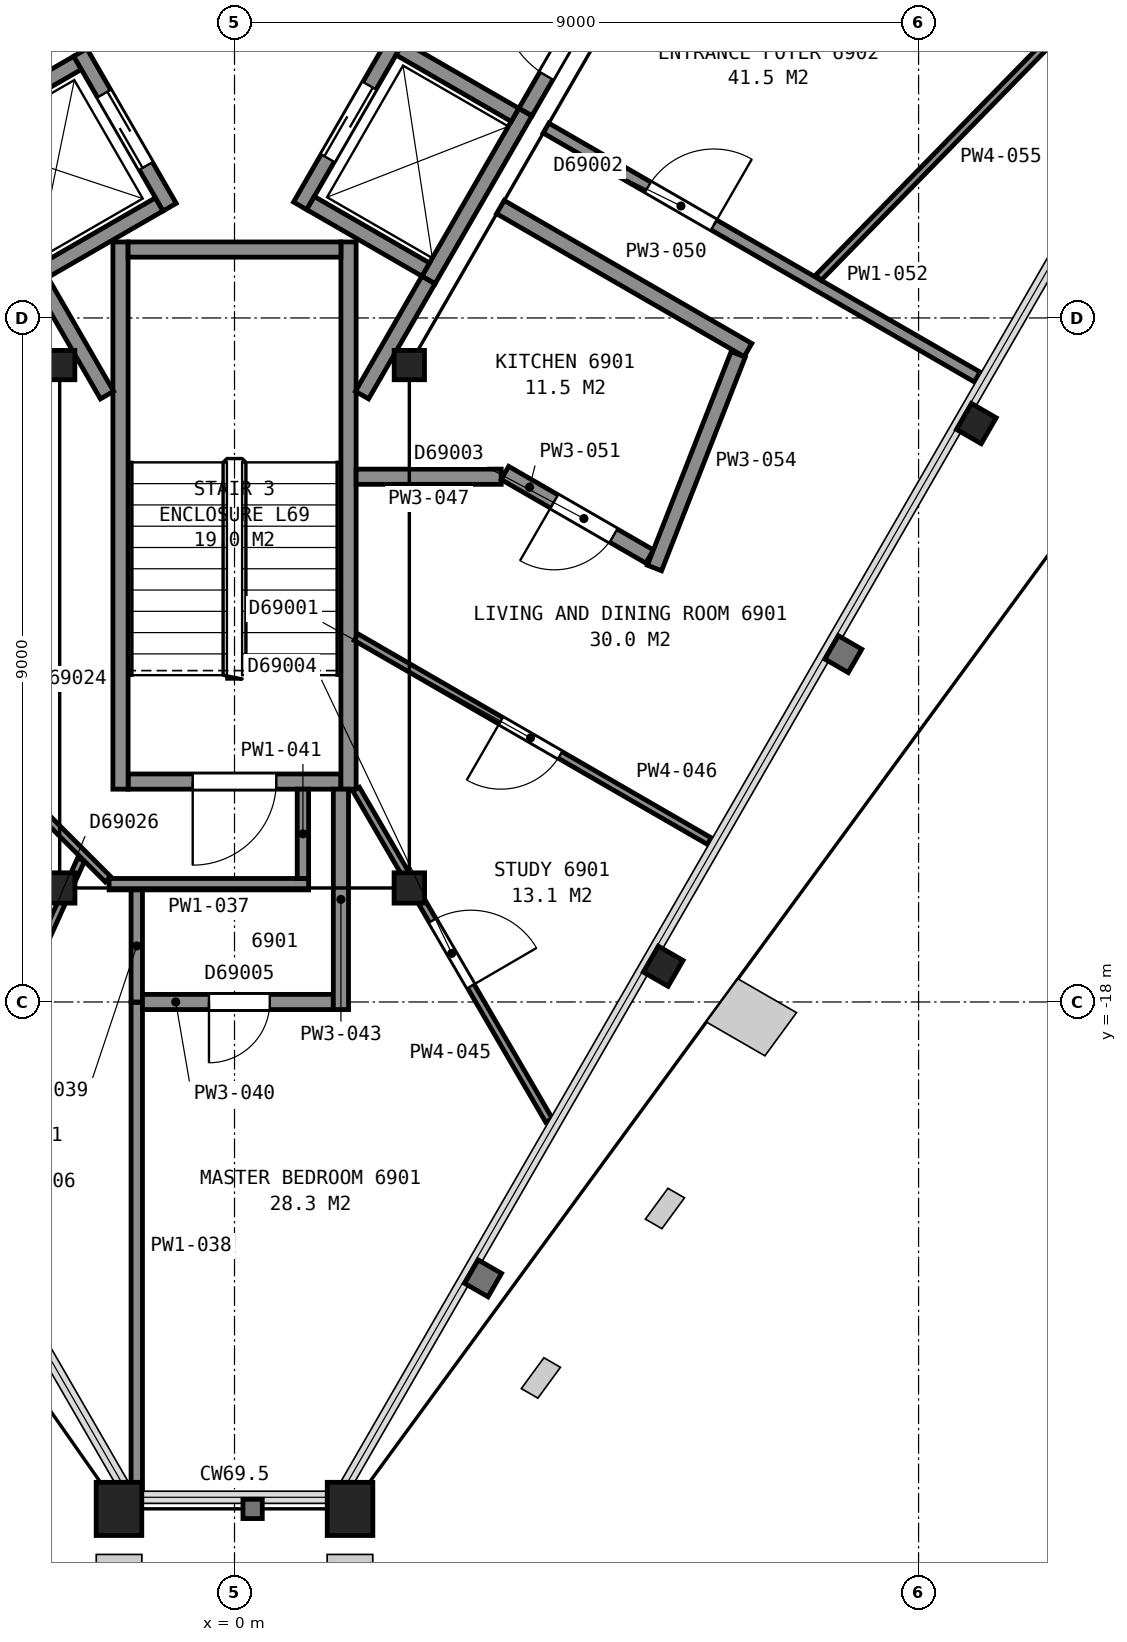
"""IFC4 building model, lengths in metres.
Left out: names, types, materials, properties, quantities, classifications, styles, units other than length and angle.
Written with IfcOpenShell. Run it as: python <this file> out.ifc"""

import sys

from ifc_helpers import new_model, si_unit, direction, frame, frame_2d, origin, origin_2d, place, context, subcontext, project, spatial, rectangle, hollow_rectangle, i_section, extrude, element, fill, save


model = new_model("IFC4")
c1 = context("Model", 3, precision=1e-05, world=origin(), true_north=direction((0.0, 1.0)))
c2 = subcontext(c1, "Body", "Model", "MODEL_VIEW")
j1 = project(units=[si_unit("LENGTHUNIT", "METRE"), si_unit("PLANEANGLEUNIT", "RADIAN")], contexts=[c1])
p1 = place(None, origin())
s1 = spatial("IfcSite", under=j1, at=p1, CompositionType="ELEMENT")
p2 = place(p1, origin())
s2 = spatial("IfcBuilding", under=s1, at=p2, CompositionType="ELEMENT")
p3 = place(p2, frame((0.0, 0.0, 275.1)))
s3 = spatial("IfcBuildingStorey", under=s2, at=p3, CompositionType="ELEMENT", Elevation=275.1)
for number, where, z_axis, x_axis in (
    (1, (-1.52, -24.67, 0.0), (0.0, 0.0, 1.0), (-1.0, 0.0, 0.0)),
    (2, (1.52, -24.67, 0.0), (0.0, 0.0, 1.0), (-1.0, 0.0, 0.0)),
):
    element("IfcColumn", number, at=place(p3, frame(where, z_axis=z_axis, x_axis=x_axis)), inside=s3, PredefinedType="COLUMN", context=c2, shape_type="SweptSolid", body=[
        extrude(hollow_rectangle(XDim=0.6, YDim=0.7, WallThickness=0.04, at=origin_2d()), origin(), (0.0, 0.0, 1.0), 3.7),
    ])
for number, where, z_axis, x_axis in (
    (3, (5.64, -17.53, 0.0), (0.0, 0.0, 1.0), (-0.5, -0.866, 0.0)),
    (4, (9.76, -10.39, 0.0), (0.0, 0.0, 1.0), (-0.5, -0.866, 0.0)),
):
    element("IfcColumn", number, at=place(p3, frame(where, z_axis=z_axis, x_axis=x_axis)), inside=s3, PredefinedType="COLUMN", context=c2, shape_type="SweptSolid", body=[
        extrude(i_section(OverallWidth=0.394, OverallDepth=0.376, WebThickness=0.017, FlangeThickness=0.028, FilletRadius=0.015, at=origin_2d()), origin(), (0.0, 0.0, 1.0), 3.7),
    ])
p4 = place(p3, frame((-2.3, -9.62, 0.0), z_axis=(0.0, 0.0, 1.0), x_axis=(1.0, 0.0, 0.0)))
e5 = element("IfcColumn", 5, at=p4, inside=s3, PredefinedType="COLUMN", context=c2, shape_type="SweptSolid", body=[
    extrude(i_section(OverallWidth=0.399, OverallDepth=0.386, WebThickness=0.021, FlangeThickness=0.033, FilletRadius=0.015, at=origin_2d()), origin(), (0.0, 0.0, 1.0), 3.7),
])
for number, where, z_axis, x_axis in (
    (6, (-2.3, -16.5, 0.0), (0.0, 0.0, 1.0), (-1.0, 0.0, 0.0)),
    (7, (2.3, -16.5, 0.0), (0.0, 0.0, 1.0), (-1.0, 0.0, 0.0)),
):
    element("IfcColumn", number, at=place(p3, frame(where, z_axis=z_axis, x_axis=x_axis)), inside=s3, PredefinedType="COLUMN", context=c2, shape_type="SweptSolid", body=[
        extrude(i_section(OverallWidth=0.401, OverallDepth=0.399, WebThickness=0.025, FlangeThickness=0.04, FilletRadius=0.015, at=origin_2d()), origin(), (0.0, 0.0, 1.0), 3.7),
    ])
p5 = place(p3, frame((2.3, -9.62, 0.0), z_axis=(0.0, 0.0, 1.0), x_axis=(1.0, 0.0, 0.0)))
e8 = element("IfcColumn", 8, at=p5, inside=s3, PredefinedType="COLUMN", context=c2, shape_type="SweptSolid", body=[
    extrude(i_section(OverallWidth=0.399, OverallDepth=0.386, WebThickness=0.021, FlangeThickness=0.033, FilletRadius=0.015, at=origin_2d()), origin(), (0.0, 0.0, 1.0), 3.7),
])
p6 = place(p3, frame((-1.4, -15.1, 0.0), z_axis=(0.0, 0.0, 1.0), x_axis=(1.0, 0.0, 0.0)))
e9 = element("IfcWall", 9, at=p6, inside=s3, PredefinedType="PARTITIONING", context=c2, shape_type="SweptSolid", body=[
    extrude(rectangle(XDim=2.8, YDim=0.2, at=frame_2d((1.4, 0.0))), origin(), (0.0, 0.0, 1.0), 3.45),
])
p7 = place(p6, frame((0.85, 0.0, 0.0)))
e10 = element("IfcOpeningElement", 10, at=p7, cuts=e9, PredefinedType="OPENING", context=c2, shape_type="SweptSolid", body=[
    extrude(rectangle(XDim=1.1, YDim=2.1, at=frame_2d((0.55, 1.05))), frame((0.0, 0.11, 0.0), z_axis=(0.0, -1.0, 0.0), x_axis=(1.0, 0.0, 0.0)), (0.0, 0.0, 1.0), 0.22),
])
for number, where, z_axis, x_axis in (
    (11, (1.5, -8.0, 0.0), (0.0, 0.0, 1.0), (0.0, -1.0, 0.0)),
    (12, (-1.5, -8.0, 0.0), (0.0, 0.0, 1.0), (0.0, -1.0, 0.0)),
):
    element("IfcWall", number, at=place(p3, frame(where, z_axis=z_axis, x_axis=x_axis)), inside=s3, PredefinedType="PARTITIONING", context=c2, shape_type="SweptSolid", body=[
        extrude(rectangle(XDim=7.2, YDim=0.2, at=frame_2d((3.6, 0.0))), origin(), (0.0, 0.0, 1.0), 3.45),
    ])
p8 = place(p3, frame((-1.4, -8.1, 0.0), z_axis=(0.0, 0.0, 1.0), x_axis=(1.0, 0.0, 0.0)))
e13 = element("IfcWall", 13, at=p8, inside=s3, PredefinedType="PARTITIONING", context=c2, shape_type="SweptSolid", body=[
    extrude(rectangle(XDim=2.8, YDim=0.2, at=frame_2d((1.4, 0.0))), origin(), (0.0, 0.0, 1.0), 3.45),
])
for number, where, z_axis, x_axis in (
    (14, (-2.505, -8.38, 0.0), (0.0, 0.0, 1.0), (0.866, 0.5, 0.0)),
    (15, (-3.58, -6.519, 0.0), (0.0, 0.0, 1.0), (0.866, 0.5, 0.0)),
):
    element("IfcWall", number, at=place(p3, frame(where, z_axis=z_axis, x_axis=x_axis)), inside=s3, PredefinedType="PARTITIONING", context=c2, shape_type="SweptSolid", body=[
        extrude(rectangle(XDim=1.75, YDim=0.2, at=frame_2d((0.875, 0.0))), origin(), (0.0, 0.0, 1.0), 3.7),
    ])
p9 = place(p3, frame((2.552, -8.5, 0.0), z_axis=(0.0, 0.0, 1.0), x_axis=(0.499990435942, 0.866030925526, 0.0)))
e16 = element("IfcWall", 16, at=p9, inside=s3, PredefinedType="PARTITIONING", context=c2, shape_type="SweptSolid", body=[
    extrude(rectangle(XDim=2.55, YDim=0.2, at=frame_2d((1.275, 0.0))), origin(), (0.0, 0.0, 1.0), 3.7),
])
p10 = place(p3, frame((0.863, -7.525, 0.0), z_axis=(0.0, 0.0, 1.0), x_axis=(0.499990435942, 0.866030925526, 0.0)))
e17 = element("IfcWall", 17, at=p10, inside=s3, PredefinedType="PARTITIONING", context=c2, shape_type="SweptSolid", body=[
    extrude(rectangle(XDim=2.55, YDim=0.2, at=frame_2d((1.275, 0.0))), origin(), (0.0, 0.0, 1.0), 3.7),
])
p11 = place(p10, frame((0.725, 0.0, 0.0)))
e18 = element("IfcOpeningElement", 18, at=p11, cuts=e17, PredefinedType="OPENING", context=c2, shape_type="SweptSolid", body=[
    extrude(rectangle(XDim=1.1, YDim=2.1, at=frame_2d((0.55, 1.05))), frame((0.0, 0.11, 0.0), z_axis=(0.0, -1.0, 0.0), x_axis=(1.0, 0.0, 0.0)), (0.0, 0.0, 1.0), 0.22),
])
p12 = place(p3, frame((-0.853, -7.542, 0.0), z_axis=(0.0, 0.0, 1.0), x_axis=(-0.500016218704, 0.866016039709, 0.0)))
e19 = element("IfcWall", 19, at=p12, inside=s3, PredefinedType="PARTITIONING", context=c2, shape_type="SweptSolid", body=[
    extrude(rectangle(XDim=2.35, YDim=0.2, at=frame_2d((1.175, 0.0))), origin(), (0.0, 0.0, 1.0), 3.7),
])
p13 = place(p12, frame((0.625, 0.0, 0.0)))
e20 = element("IfcOpeningElement", 20, at=p13, cuts=e19, PredefinedType="OPENING", context=c2, shape_type="SweptSolid", body=[
    extrude(rectangle(XDim=1.1, YDim=2.1, at=frame_2d((0.55, 1.05))), frame((0.0, 0.11, 0.0), z_axis=(0.0, -1.0, 0.0), x_axis=(1.0, 0.0, 0.0)), (0.0, 0.0, 1.0), 0.22),
])
for number, where, z_axis, x_axis in (
    (21, (3.69, -6.328, 0.0), (0.0, 0.0, 1.0), (-0.866, 0.5, 0.0)),
    (22, (2.515, -8.363, 0.0), (0.0, 0.0, 1.0), (-0.866, 0.5, 0.0)),
):
    element("IfcWall", number, at=place(p3, frame(where, z_axis=z_axis, x_axis=x_axis)), inside=s3, PredefinedType="PARTITIONING", context=c2, shape_type="SweptSolid", body=[
        extrude(rectangle(XDim=1.75, YDim=0.2, at=frame_2d((0.875, 0.0))), origin(), (0.0, 0.0, 1.0), 3.7),
    ])
p14 = place(p3, frame((-2.541, -8.519, 0.0), z_axis=(0.0, 0.0, 1.0), x_axis=(0.500016142392, -0.86601608377, 0.0)))
e23 = element("IfcWall", 23, at=p14, inside=s3, PredefinedType="PARTITIONING", context=c2, shape_type="SweptSolid", body=[
    extrude(rectangle(XDim=1.727, YDim=0.2, at=frame_2d((0.864, 0.0))), origin(), (0.0, 0.0, 1.0), 3.45),
])
p15 = place(p3, frame((1.677, -10.015, 0.0), z_axis=(0.0, 0.0, 1.0), x_axis=(0.49983532306, 0.866120459187, 0.0)))
e24 = element("IfcWall", 24, at=p15, inside=s3, PredefinedType="PARTITIONING", context=c2, shape_type="SweptSolid", body=[
    extrude(rectangle(XDim=1.748, YDim=0.2, at=frame_2d((0.874, 0.0))), origin(), (0.0, 0.0, 1.0), 3.45),
])
p16 = place(p3, frame((3.828, -6.29, 0.0), z_axis=(0.0, 0.0, 1.0), x_axis=(0.499979739078, 0.866037101117, 0.0)))
e25 = element("IfcWall", 25, at=p16, inside=s3, PredefinedType="PARTITIONING", context=c2, shape_type="SweptSolid", body=[
    extrude(rectangle(XDim=11.363, YDim=0.2, at=frame_2d((5.681, 0.0))), origin(), (0.0, 0.0, 1.0), 3.45),
])
p17 = place(p16, frame((0.55, 0.0, 0.0)))
e26 = element("IfcOpeningElement", 26, at=p17, cuts=e25, PredefinedType="OPENING", context=c2, shape_type="SweptSolid", body=[
    extrude(rectangle(XDim=1.2, YDim=2.1, at=frame_2d((0.6, 1.05))), frame((0.0, 0.11, 0.0), z_axis=(0.0, -1.0, 0.0), x_axis=(1.0, 0.0, 0.0)), (0.0, 0.0, 1.0), 0.22),
])
p18 = place(p3, frame((-2.019, -16.127, 0.0), z_axis=(0.0, 0.0, 1.0), x_axis=(-0.411876718461, -0.911239578151, 0.0)))
e27 = element("IfcWall", 27, at=p18, inside=s3, PredefinedType="PARTITIONING", context=c2, shape_type="SweptSolid", body=[
    extrude(rectangle(XDim=4.376, YDim=0.1, at=frame_2d((2.188, 0.0))), origin(), (0.0, 0.0, 1.0), 2.723),
])
p19 = place(p18, frame((1.591, 0.0, 0.0)))
e28 = element("IfcOpeningElement", 28, at=p19, cuts=e27, PredefinedType="OPENING", context=c2, shape_type="SweptSolid", body=[
    extrude(rectangle(XDim=1.0, YDim=2.1, at=frame_2d((0.5, 1.05))), frame((0.0, 0.06, 0.0), z_axis=(0.0, -1.0, 0.0), x_axis=(1.0, 0.0, 0.0)), (0.0, 0.0, 1.0), 0.12),
])
p20 = place(p3, frame((-2.801, -15.25, 0.0), z_axis=(0.0, 0.0, 1.0), x_axis=(0.707106781187, -0.707106781187, 0.0)))
e29 = element("IfcWall", 29, at=p20, inside=s3, PredefinedType="PARTITIONING", context=c2, shape_type="SweptSolid", body=[
    extrude(rectangle(XDim=1.608, YDim=0.1, at=frame_2d((0.804, 0.0))), origin(), (0.0, 0.0, 1.0), 2.723),
])
p21 = place(p3, frame((-1.65, -16.45, 0.0), z_axis=(0.0, 0.0, 1.0), x_axis=(1.0, 0.0, 0.0)))
e30 = element("IfcWall", 30, at=p21, inside=s3, PredefinedType="PARTITIONING", context=c2, shape_type="SweptSolid", body=[
    extrude(rectangle(XDim=2.625, YDim=0.15, at=frame_2d((1.312, 0.0))), origin(), (0.0, 0.0, 1.0), 2.723),
])
p22 = place(p3, frame((-1.286, -24.421, 0.0), z_axis=(0.0, 0.0, 1.0), x_axis=(0.0, 1.0, 0.0)))
e31 = element("IfcWall", 31, at=p22, inside=s3, PredefinedType="PARTITIONING", context=c2, shape_type="SweptSolid", body=[
    extrude(rectangle(XDim=6.416, YDim=0.15, at=frame_2d((3.208, 0.0))), origin(), (0.0, 0.0, 1.0), 2.723),
])
p23 = place(p3, frame((-1.286, -18.0, 0.0), z_axis=(0.0, 0.0, 1.0), x_axis=(0.0, 1.0, 0.0)))
e32 = element("IfcWall", 32, at=p23, inside=s3, PredefinedType="PARTITIONING", context=c2, shape_type="SweptSolid", body=[
    extrude(rectangle(XDim=1.475, YDim=0.15, at=frame_2d((0.738, 0.0))), origin(), (0.0, 0.0, 1.0), 2.723),
])
p24 = place(p3, frame((-1.211, -18.0, 0.0), z_axis=(0.0, 0.0, 1.0), x_axis=(1.0, 0.0, 0.0)))
e33 = element("IfcWall", 33, at=p24, inside=s3, PredefinedType="PARTITIONING", context=c2, shape_type="SweptSolid", body=[
    extrude(rectangle(XDim=2.511, YDim=0.2, at=frame_2d((1.255, 0.0))), origin(), (0.0, 0.0, 1.0), 2.723),
])
p25 = place(p24, frame((0.875, 0.0, 0.0)))
e34 = element("IfcOpeningElement", 34, at=p25, cuts=e33, PredefinedType="OPENING", context=c2, shape_type="SweptSolid", body=[
    extrude(rectangle(XDim=0.8, YDim=2.1, at=frame_2d((0.4, 1.05))), frame((0.0, 0.11, 0.0), z_axis=(0.0, -1.0, 0.0), x_axis=(1.0, 0.0, 0.0)), (0.0, 0.0, 1.0), 0.22),
])
p26 = place(p3, frame((0.9, -16.375, 0.0), z_axis=(0.0, 0.0, 1.0), x_axis=(0.0, 1.0, 0.0)))
e35 = element("IfcWall", 35, at=p26, inside=s3, PredefinedType="PARTITIONING", context=c2, shape_type="SweptSolid", body=[
    extrude(rectangle(XDim=1.175, YDim=0.15, at=frame_2d((0.587, 0.0))), origin(), (0.0, 0.0, 1.0), 2.723),
])
p27 = place(p3, frame((1.4, -18.1, 0.0), z_axis=(0.0, 0.0, 1.0), x_axis=(0.0, 1.0, 0.0)))
e36 = element("IfcWall", 36, at=p27, inside=s3, PredefinedType="PARTITIONING", context=c2, shape_type="SweptSolid", body=[
    extrude(rectangle(XDim=2.9, YDim=0.2, at=frame_2d((1.45, 0.0))), origin(), (0.0, 0.0, 1.0), 2.723),
])
p28 = place(p3, frame((4.137, -19.557, 0.0), z_axis=(0.0, 0.0, 1.0), x_axis=(-0.503229634544, 0.864152726615, 0.0)))
e37 = element("IfcWall", 37, at=p28, inside=s3, PredefinedType="PARTITIONING", context=c2, shape_type="SweptSolid", body=[
    extrude(rectangle(XDim=5.042, YDim=0.1, at=frame_2d((2.521, 0.0))), origin(), (0.0, 0.0, 1.0), 2.723),
])
p29 = place(p28, frame((2.042, 0.0, 0.0)))
e38 = element("IfcOpeningElement", 38, at=p29, cuts=e37, PredefinedType="OPENING", context=c2, shape_type="SweptSolid", body=[
    extrude(rectangle(XDim=1.0, YDim=2.1, at=frame_2d((0.5, 1.05))), frame((0.0, 0.06, 0.0), z_axis=(0.0, -1.0, 0.0), x_axis=(1.0, 0.0, 0.0)), (0.0, 0.0, 1.0), 0.12),
])
p30 = place(p3, frame((6.247, -15.883, 0.0), z_axis=(0.0, 0.0, 1.0), x_axis=(-0.866008267802, 0.500029679218, 0.0)))
e39 = element("IfcWall", 39, at=p30, inside=s3, PredefinedType="PARTITIONING", context=c2, shape_type="SweptSolid", body=[
    extrude(rectangle(XDim=5.365, YDim=0.1, at=frame_2d((2.683, 0.0))), origin(), (0.0, 0.0, 1.0), 2.723),
])
p31 = place(p30, frame((2.265, 0.0, 0.0)))
e40 = element("IfcOpeningElement", 40, at=p31, cuts=e39, PredefinedType="OPENING", context=c2, shape_type="SweptSolid", body=[
    extrude(rectangle(XDim=0.9, YDim=2.1, at=frame_2d((0.45, 1.05))), frame((0.0, 0.06, 0.0), z_axis=(0.0, -1.0, 0.0), x_axis=(1.0, 0.0, 0.0)), (0.0, 0.0, 1.0), 0.12),
])
p32 = place(p3, frame((1.6, -11.089, 0.0), z_axis=(0.0, 0.0, 1.0), x_axis=(1.0, 0.0, 0.0)))
e41 = element("IfcWall", 41, at=p32, inside=s3, PredefinedType="PARTITIONING", context=c2, shape_type="SweptSolid", body=[
    extrude(rectangle(XDim=1.909, YDim=0.2, at=frame_2d((0.955, 0.0))), origin(), (0.0, 0.0, 1.0), 2.723),
])
p33 = place(p3, frame((3.498, -7.541, 0.0), z_axis=(0.0, 0.0, 1.0), x_axis=(0.865985624761, -0.500068892961, 0.0)))
e42 = element("IfcWall", 42, at=p33, inside=s3, PredefinedType="PARTITIONING", context=c2, shape_type="SweptSolid", body=[
    extrude(rectangle(XDim=3.762, YDim=0.2, at=frame_2d((1.881, 0.0))), origin(), (0.0, 0.0, 1.0), 2.723),
])
p34 = place(p3, frame((3.557, -11.039, 0.0), z_axis=(0.0, 0.0, 1.0), x_axis=(0.865932364885, -0.500161113487, 0.0)))
e43 = element("IfcWall", 43, at=p34, inside=s3, PredefinedType="PARTITIONING", context=c2, shape_type="SweptSolid", body=[
    extrude(rectangle(XDim=2.2, YDim=0.2, at=frame_2d((1.1, 0.0))), origin(), (0.0, 0.0, 1.0), 2.723),
])
p35 = place(p34, frame((0.75, 0.0, 0.0)))
e44 = element("IfcOpeningElement", 44, at=p35, cuts=e43, PredefinedType="OPENING", context=c2, shape_type="SweptSolid", body=[
    extrude(rectangle(XDim=0.9, YDim=2.1, at=frame_2d((0.45, 1.05))), frame((0.0, 0.11, 0.0), z_axis=(0.0, -1.0, 0.0), x_axis=(1.0, 0.0, 0.0)), (0.0, 0.0, 1.0), 0.22),
])
p36 = place(p3, frame((9.772, -9.777, 0.0), z_axis=(0.0, 0.0, 1.0), x_axis=(-0.866083818164, 0.499898809675, 0.0)))
e45 = element("IfcWall", 45, at=p36, inside=s3, PredefinedType="PARTITIONING", context=c2, shape_type="SweptSolid", body=[
    extrude(rectangle(XDim=6.551, YDim=0.15, at=frame_2d((3.275, 0.0))), origin(), (0.0, 0.0, 1.0), 2.723),
])
p37 = place(p36, frame((4.001, 0.0, 0.0)))
e46 = element("IfcOpeningElement", 46, at=p37, cuts=e45, PredefinedType="OPENING", context=c2, shape_type="SweptSolid", body=[
    extrude(rectangle(XDim=1.0, YDim=2.1, at=frame_2d((0.5, 1.05))), frame((0.0, 0.085, 0.0), z_axis=(0.0, -1.0, 0.0), x_axis=(1.0, 0.0, 0.0)), (0.0, 0.0, 1.0), 0.17),
])
p38 = place(p3, frame((5.526, -12.29, 0.0), z_axis=(0.0, 0.0, 1.0), x_axis=(0.364786545928, 0.931091174864, 0.0)))
e47 = element("IfcWall", 47, at=p38, inside=s3, PredefinedType="PARTITIONING", context=c2, shape_type="SweptSolid", body=[
    extrude(rectangle(XDim=3.019, YDim=0.2, at=frame_2d((1.51, 0.0))), origin(), (0.0, 0.0, 1.0), 2.723),
])
p39 = place(p3, frame((7.682, -8.47, 0.0), z_axis=(0.0, 0.0, 1.0), x_axis=(0.698777378461, 0.715339203002, 0.0)))
e48 = element("IfcWall", 48, at=p39, inside=s3, PredefinedType="PARTITIONING", context=c2, shape_type="SweptSolid", body=[
    extrude(rectangle(XDim=4.452, YDim=0.1, at=frame_2d((2.226, 0.0))), origin(), (0.0, 0.0, 1.0), 2.723),
])
p40 = place(p7, origin())
e49 = element("IfcDoor", 49, at=p40, inside=s3, OperationType="SINGLE_SWING_LEFT", PredefinedType="DOOR", context=c2, shape_type="SweptSolid", body=[
    extrude(rectangle(XDim=1.1, YDim=2.1, at=frame_2d((0.55, 1.05))), frame((0.0, 0.025, 0.0), z_axis=(0.0, -1.0, 0.0), x_axis=(1.0, 0.0, 0.0)), (0.0, 0.0, 1.0), 0.05),
])
fill(e10, e49)
p41 = place(p13, origin())
e50 = element("IfcDoor", 50, at=p41, inside=s3, OperationType="SLIDING_TO_LEFT", PredefinedType="DOOR", context=c2, shape_type="SweptSolid", body=[
    extrude(rectangle(XDim=1.1, YDim=2.1, at=frame_2d((0.55, 1.05))), frame((0.0, 0.025, 0.0), z_axis=(0.0, -1.0, 0.0), x_axis=(1.0, 0.0, 0.0)), (0.0, 0.0, 1.0), 0.05),
])
fill(e20, e50)
p42 = place(p11, origin())
e51 = element("IfcDoor", 51, at=p42, inside=s3, OperationType="SLIDING_TO_LEFT", PredefinedType="DOOR", context=c2, shape_type="SweptSolid", body=[
    extrude(rectangle(XDim=1.1, YDim=2.1, at=frame_2d((0.55, 1.05))), frame((0.0, 0.025, 0.0), z_axis=(0.0, -1.0, 0.0), x_axis=(1.0, 0.0, 0.0)), (0.0, 0.0, 1.0), 0.05),
])
fill(e18, e51)
p43 = place(p17, origin())
e52 = element("IfcDoor", 52, at=p43, inside=s3, OperationType="SINGLE_SWING_RIGHT", PredefinedType="DOOR", context=c2, shape_type="SweptSolid", body=[
    extrude(rectangle(XDim=1.2, YDim=2.1, at=frame_2d((0.6, 1.05))), frame((0.0, 0.025, 0.0), z_axis=(0.0, -1.0, 0.0), x_axis=(1.0, 0.0, 0.0)), (0.0, 0.0, 1.0), 0.05),
])
fill(e26, e52)
p44 = place(p25, origin())
e53 = element("IfcDoor", 53, at=p44, inside=s3, OperationType="SINGLE_SWING_LEFT", PredefinedType="DOOR", context=c2, shape_type="SweptSolid", body=[
    extrude(rectangle(XDim=0.8, YDim=2.1, at=frame_2d((0.4, 1.05))), frame((0.0, 0.025, 0.0), z_axis=(0.0, -1.0, 0.0), x_axis=(1.0, 0.0, 0.0)), (0.0, 0.0, 1.0), 0.05),
])
fill(e34, e53)
p45 = place(p29, origin())
e54 = element("IfcDoor", 54, at=p45, inside=s3, OperationType="SINGLE_SWING_LEFT", PredefinedType="DOOR", context=c2, shape_type="SweptSolid", body=[
    extrude(rectangle(XDim=1.0, YDim=2.1, at=frame_2d((0.5, 1.05))), frame((0.0, 0.025, 0.0), z_axis=(0.0, -1.0, 0.0), x_axis=(1.0, 0.0, 0.0)), (0.0, 0.0, 1.0), 0.05),
])
fill(e38, e54)
p46 = place(p31, origin())
e55 = element("IfcDoor", 55, at=p46, inside=s3, OperationType="SINGLE_SWING_RIGHT", PredefinedType="DOOR", context=c2, shape_type="SweptSolid", body=[
    extrude(rectangle(XDim=0.9, YDim=2.1, at=frame_2d((0.45, 1.05))), frame((0.0, 0.025, 0.0), z_axis=(0.0, -1.0, 0.0), x_axis=(1.0, 0.0, 0.0)), (0.0, 0.0, 1.0), 0.05),
])
fill(e40, e55)
p47 = place(p35, origin())
e56 = element("IfcDoor", 56, at=p47, inside=s3, OperationType="SINGLE_SWING_LEFT", PredefinedType="DOOR", context=c2, shape_type="SweptSolid", body=[
    extrude(rectangle(XDim=0.9, YDim=2.1, at=frame_2d((0.45, 1.05))), frame((0.0, 0.025, 0.0), z_axis=(0.0, -1.0, 0.0), x_axis=(1.0, 0.0, 0.0)), (0.0, 0.0, 1.0), 0.05),
])
fill(e44, e56)
p48 = place(p37, origin())
e57 = element("IfcDoor", 57, at=p48, inside=s3, OperationType="SINGLE_SWING_LEFT", PredefinedType="DOOR", context=c2, shape_type="SweptSolid", body=[
    extrude(rectangle(XDim=1.0, YDim=2.1, at=frame_2d((0.5, 1.05))), frame((0.0, 0.025, 0.0), z_axis=(0.0, -1.0, 0.0), x_axis=(1.0, 0.0, 0.0)), (0.0, 0.0, 1.0), 0.05),
])
fill(e46, e57)
save(model, sys.argv[1])
